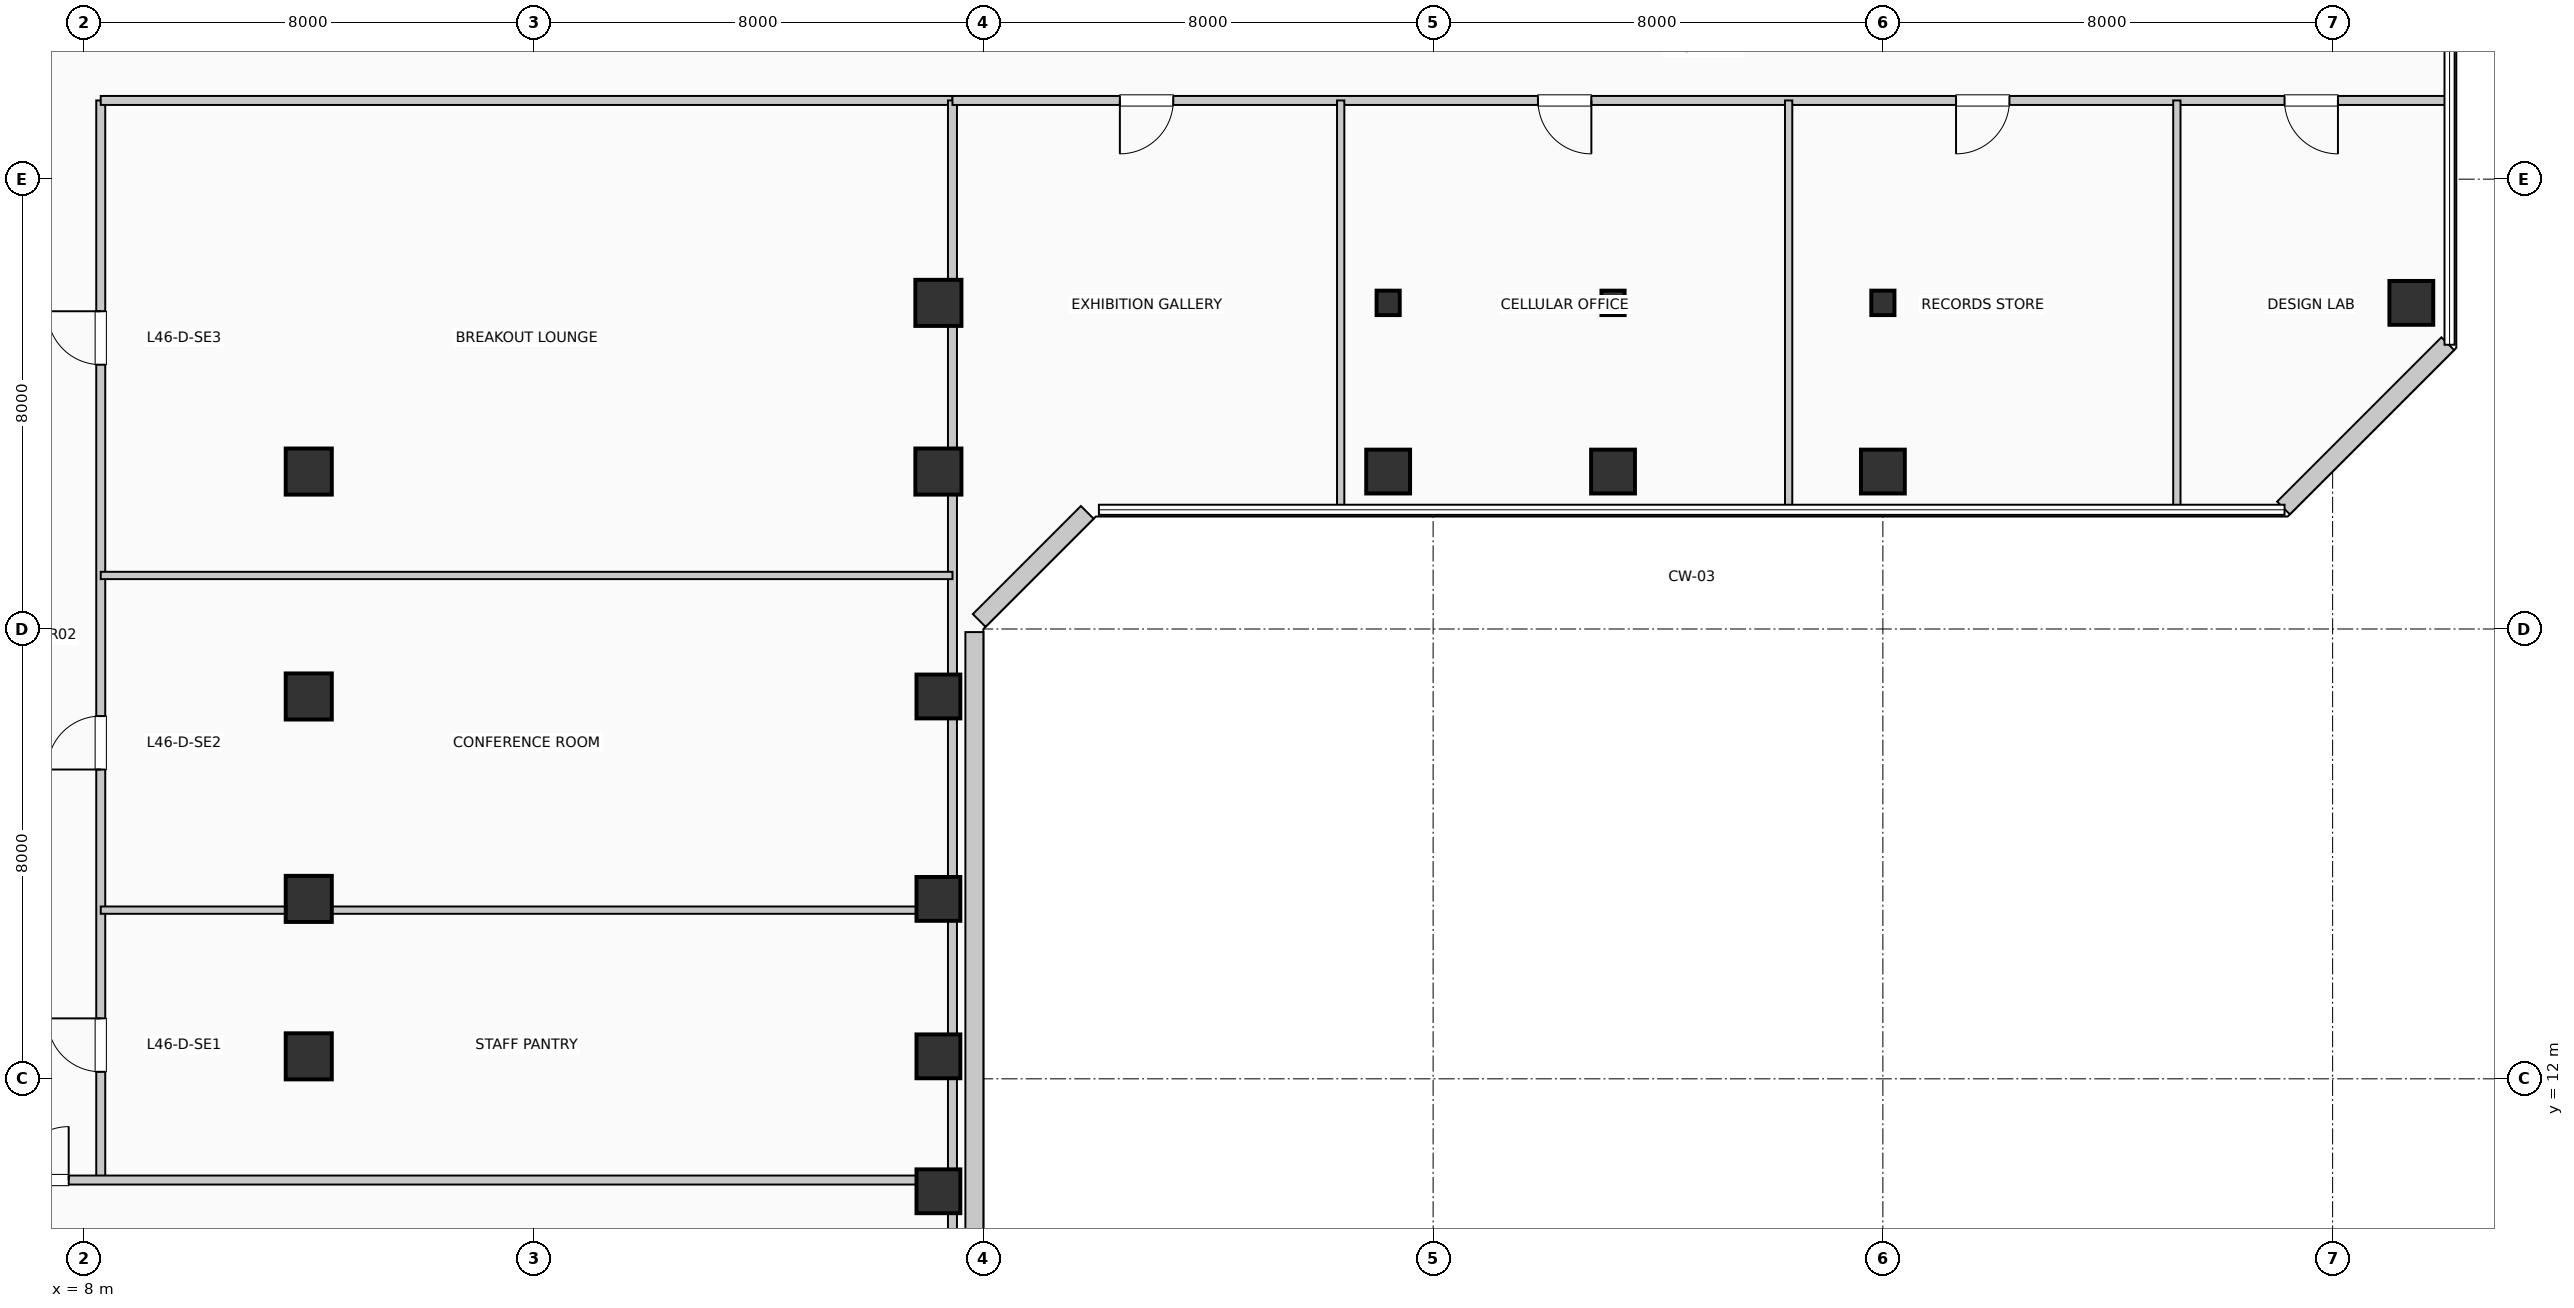
"""IFC4 building model, lengths in metres.
Left out: names, types, materials, properties, quantities, classifications, styles, units other than length and angle.
Written with IfcOpenShell. Run it as: python <this file> out.ifc"""

import sys

from ifc_helpers import new_model, si_unit, direction, frame, frame_2d, origin, origin_2d, place, context, subcontext, project, spatial, rectangle, i_section, extrude, element, fill, save


model = new_model("IFC4")
c1 = context("Model", 3, precision=1e-05, world=origin(), true_north=direction((0.0, 1.0)))
c2 = subcontext(c1, "Body", "Model", "MODEL_VIEW")
j1 = project(units=[si_unit("LENGTHUNIT", "METRE"), si_unit("PLANEANGLEUNIT", "RADIAN")], contexts=[c1])
p1 = place(None, origin())
s1 = spatial("IfcSite", under=j1, at=p1, CompositionType="ELEMENT")
p2 = place(p1, origin())
s2 = spatial("IfcBuilding", under=s1, at=p2, CompositionType="ELEMENT")
p3 = place(p2, frame((0.0, 0.0, 191.4)))
s3 = spatial("IfcBuildingStorey", under=s2, at=p3, CompositionType="ELEMENT", Elevation=191.4)
for number, where, z_axis, x_axis in (
    (1, (12.0, 12.4, 0.0), (0.0, 0.0, 1.0), (1.0, 0.0, 0.0)),
    (2, (12.0, 15.2, 0.0), (0.0, 0.0, 1.0), (1.0, 0.0, 0.0)),
    (3, (12.0, 18.8, 0.0), (0.0, 0.0, 1.0), (1.0, 0.0, 0.0)),
    (4, (12.0, 22.8, 0.0), (0.0, 0.0, 1.0), (1.0, 0.0, 0.0)),
):
    element("IfcColumn", number, at=place(p3, frame(where, z_axis=z_axis, x_axis=x_axis)), inside=s3, PredefinedType="COLUMN", context=c2, shape_type="SweptSolid", body=[
        extrude(rectangle(XDim=0.82, YDim=0.82, at=origin_2d()), origin(), (0.0, 0.0, 1.0), 3.96),
    ])
for number, where, z_axis, x_axis in (
    (5, (23.2, 10.0, 0.0), (0.0, 0.0, 1.0), (1.0, 0.0, 0.0)),
    (6, (23.2, 12.4, 0.0), (0.0, 0.0, 1.0), (1.0, 0.0, 0.0)),
    (7, (23.2, 15.2, 0.0), (0.0, 0.0, 1.0), (1.0, 0.0, 0.0)),
    (8, (23.2, 18.8, 0.0), (0.0, 0.0, 1.0), (1.0, 0.0, 0.0)),
):
    element("IfcColumn", number, at=place(p3, frame(where, z_axis=z_axis, x_axis=x_axis)), inside=s3, PredefinedType="COLUMN", context=c2, shape_type="SweptSolid", body=[
        extrude(rectangle(XDim=0.78, YDim=0.78, at=origin_2d()), origin(), (0.0, 0.0, 1.0), 3.96),
    ])
for number, where, z_axis, x_axis in (
    (9, (23.2, 22.8, 0.0), (0.0, 0.0, 1.0), (1.0, 0.0, 0.0)),
    (10, (23.2, 25.8, 0.0), (0.0, 0.0, 1.0), (1.0, 0.0, 0.0)),
):
    element("IfcColumn", number, at=place(p3, frame(where, z_axis=z_axis, x_axis=x_axis)), inside=s3, PredefinedType="COLUMN", context=c2, shape_type="SweptSolid", body=[
        extrude(rectangle(XDim=0.82, YDim=0.82, at=origin_2d()), origin(), (0.0, 0.0, 1.0), 3.96),
    ])
p4 = place(p3, frame((31.2, 22.8, 0.0), z_axis=(0.0, 0.0, 1.0), x_axis=(1.0, 0.0, 0.0)))
e11 = element("IfcColumn", 11, at=p4, inside=s3, PredefinedType="COLUMN", context=c2, shape_type="SweptSolid", body=[
    extrude(rectangle(XDim=0.78, YDim=0.78, at=origin_2d()), origin(), (0.0, 0.0, 1.0), 3.96),
])
p5 = place(p3, frame((31.2, 25.8, 0.0), z_axis=(0.0, 0.0, 1.0), x_axis=(1.0, 0.0, 0.0)))
e12 = element("IfcColumn", 12, at=p5, inside=s3, PredefinedType="COLUMN", context=c2, shape_type="SweptSolid", body=[
    extrude(i_section(OverallWidth=0.412, OverallDepth=0.435, WebThickness=0.027, FlangeThickness=0.043, at=origin_2d()), origin(), (0.0, 0.0, 1.0), 3.96),
])
p6 = place(p3, frame((35.2, 22.8, 0.0), z_axis=(0.0, 0.0, 1.0), x_axis=(1.0, 0.0, 0.0)))
e13 = element("IfcColumn", 13, at=p6, inside=s3, PredefinedType="COLUMN", context=c2, shape_type="SweptSolid", body=[
    extrude(rectangle(XDim=0.78, YDim=0.78, at=origin_2d()), origin(), (0.0, 0.0, 1.0), 3.96),
])
p7 = place(p3, frame((35.2, 25.8, 0.0), z_axis=(0.0, 0.0, 1.0), x_axis=(1.0, 0.0, 0.0)))
e14 = element("IfcColumn", 14, at=p7, inside=s3, PredefinedType="COLUMN", context=c2, shape_type="SweptSolid", body=[
    extrude(i_section(OverallWidth=0.412, OverallDepth=0.435, WebThickness=0.027, FlangeThickness=0.043, at=origin_2d()), origin(), (0.0, 0.0, 1.0), 3.96),
])
p8 = place(p3, frame((40.0, 22.8, 0.0), z_axis=(0.0, 0.0, 1.0), x_axis=(1.0, 0.0, 0.0)))
e15 = element("IfcColumn", 15, at=p8, inside=s3, PredefinedType="COLUMN", context=c2, shape_type="SweptSolid", body=[
    extrude(rectangle(XDim=0.78, YDim=0.78, at=origin_2d()), origin(), (0.0, 0.0, 1.0), 3.96),
])
p9 = place(p3, frame((40.0, 25.8, 0.0), z_axis=(0.0, 0.0, 1.0), x_axis=(1.0, 0.0, 0.0)))
e16 = element("IfcColumn", 16, at=p9, inside=s3, PredefinedType="COLUMN", context=c2, shape_type="SweptSolid", body=[
    extrude(i_section(OverallWidth=0.412, OverallDepth=0.435, WebThickness=0.027, FlangeThickness=0.043, at=origin_2d()), origin(), (0.0, 0.0, 1.0), 3.96),
])
p10 = place(p3, frame((49.4, 25.8, 0.0), z_axis=(0.0, 0.0, 1.0), x_axis=(1.0, 0.0, 0.0)))
e17 = element("IfcColumn", 17, at=p10, inside=s3, PredefinedType="COLUMN", context=c2, shape_type="SweptSolid", body=[
    extrude(rectangle(XDim=0.78, YDim=0.78, at=origin_2d()), origin(), (0.0, 0.0, 1.0), 3.96),
])
p11 = place(p3, frame((23.84, 8.855, 0.0), z_axis=(0.0, 0.0, 1.0), x_axis=(0.0, 1.0, 0.0)))
e18 = element("IfcWall", 18, at=p11, inside=s3, PredefinedType="SOLIDWALL", context=c2, shape_type="SweptSolid", body=[
    extrude(rectangle(XDim=11.09, YDim=0.32, at=frame_2d((5.545, 0.0))), origin(), (0.0, 0.0, 1.0), 3.71),
])
p12 = place(p3, frame((23.926, 20.152, 0.0), z_axis=(0.0, 0.0, 1.0), x_axis=(0.707106781187, 0.707106781187, 0.0)))
e19 = element("IfcWall", 19, at=p12, inside=s3, PredefinedType="SOLIDWALL", context=c2, shape_type="SweptSolid", body=[
    extrude(rectangle(XDim=2.718, YDim=0.32, at=frame_2d((1.359, 0.0))), origin(), (0.0, 0.0, 1.0), 3.71),
])
p13 = place(p3, frame((47.126, 22.152, 0.0), z_axis=(0.0, 0.0, 1.0), x_axis=(0.707136318428, 0.707077242712, 0.0)))
e20 = element("IfcWall", 20, at=p13, inside=s3, PredefinedType="SOLIDWALL", context=c2, shape_type="SweptSolid", body=[
    extrude(rectangle(XDim=4.133, YDim=0.32, at=frame_2d((2.066, 0.0))), origin(), (0.0, 0.0, 1.0), 3.71),
])
p14 = place(p3, frame((8.3, 10.2, 0.0), z_axis=(0.0, 0.0, 1.0), x_axis=(0.0, 1.0, 0.0)))
e21 = element("IfcWall", 21, at=p14, inside=s3, PredefinedType="PARTITIONING", context=c2, shape_type="SweptSolid", body=[
    extrude(rectangle(XDim=19.2, YDim=0.16, at=frame_2d((9.6, 0.0))), origin(), (0.0, 0.0, 1.0), 3.71),
])
p15 = place(p14, frame((1.925, 0.0, 0.0)))
e22 = element("IfcOpeningElement", 22, at=p15, cuts=e21, PredefinedType="OPENING", context=c2, shape_type="SweptSolid", body=[
    extrude(rectangle(XDim=0.95, YDim=2.15, at=frame_2d((0.475, 1.075))), frame((0.0, 0.09, 0.0), z_axis=(0.0, -1.0, 0.0), x_axis=(1.0, 0.0, 0.0)), (0.0, 0.0, 1.0), 0.18),
])
p16 = place(p14, frame((7.301, 0.0, 0.0)))
e23 = element("IfcOpeningElement", 23, at=p16, cuts=e21, PredefinedType="OPENING", context=c2, shape_type="SweptSolid", body=[
    extrude(rectangle(XDim=0.95, YDim=2.15, at=frame_2d((0.475, 1.075))), frame((0.0, 0.09, 0.0), z_axis=(0.0, -1.0, 0.0), x_axis=(1.0, 0.0, 0.0)), (0.0, 0.0, 1.0), 0.18),
])
p17 = place(p14, frame((14.501, 0.0, 0.0)))
e24 = element("IfcOpeningElement", 24, at=p17, cuts=e21, PredefinedType="OPENING", context=c2, shape_type="SweptSolid", body=[
    extrude(rectangle(XDim=0.95, YDim=2.15, at=frame_2d((0.475, 1.075))), frame((0.0, 0.09, 0.0), z_axis=(0.0, -1.0, 0.0), x_axis=(1.0, 0.0, 0.0)), (0.0, 0.0, 1.0), 0.18),
])
p18 = place(p3, frame((0.19, 10.2, 0.0), z_axis=(0.0, 0.0, 1.0), x_axis=(1.0, 0.0, 0.0)))
e25 = element("IfcWall", 25, at=p18, inside=s3, PredefinedType="PARTITIONING", context=c2, shape_type="SweptSolid", body=[
    extrude(rectangle(XDim=23.26, YDim=0.16, at=frame_2d((11.63, 0.0))), origin(), (0.0, 0.0, 1.0), 3.095),
])
p19 = place(p18, frame((6.59, 0.0, 0.0)))
e26 = element("IfcOpeningElement", 26, at=p19, cuts=e25, PredefinedType="OPENING", context=c2, shape_type="SweptSolid", body=[
    extrude(rectangle(XDim=0.95, YDim=2.15, at=frame_2d((0.475, 1.075))), frame((0.0, 0.09, 0.0), z_axis=(0.0, -1.0, 0.0), x_axis=(1.0, 0.0, 0.0)), (0.0, 0.0, 1.0), 0.18),
])
p20 = place(p3, frame((8.3, 29.4, 0.0), z_axis=(0.0, 0.0, 1.0), x_axis=(1.0, 0.0, 0.0)))
e27 = element("IfcWall", 27, at=p20, inside=s3, PredefinedType="PARTITIONING", context=c2, shape_type="SweptSolid", body=[
    extrude(rectangle(XDim=15.15, YDim=0.16, at=frame_2d((7.575, 0.0))), origin(), (0.0, 0.0, 1.0), 3.365),
])
p21 = place(p3, frame((23.45, 5.99, 0.0), z_axis=(0.0, 0.0, 1.0), x_axis=(0.0, 1.0, 0.0)))
e28 = element("IfcWall", 28, at=p21, inside=s3, PredefinedType="PARTITIONING", context=c2, shape_type="SweptSolid", body=[
    extrude(rectangle(XDim=23.41, YDim=0.16, at=frame_2d((11.705, 0.0))), origin(), (0.0, 0.0, 1.0), 3.095),
])
p22 = place(p3, frame((8.3, 15.0, 0.0), z_axis=(0.0, 0.0, 1.0), x_axis=(1.0, 0.0, 0.0)))
e29 = element("IfcWall", 29, at=p22, inside=s3, PredefinedType="PARTITIONING", context=c2, shape_type="SweptSolid", body=[
    extrude(rectangle(XDim=15.15, YDim=0.13, at=frame_2d((7.575, 0.0))), origin(), (0.0, 0.0, 1.0), 3.095),
])
p23 = place(p3, frame((8.3, 20.952, 0.0), z_axis=(0.0, 0.0, 1.0), x_axis=(1.0, 0.0, 0.0)))
e30 = element("IfcWall", 30, at=p23, inside=s3, PredefinedType="PARTITIONING", context=c2, shape_type="SweptSolid", body=[
    extrude(rectangle(XDim=15.15, YDim=0.13, at=frame_2d((7.575, 0.0))), origin(), (0.0, 0.0, 1.0), 3.71),
])
p24 = place(p3, frame((23.45, 29.4, 0.0), z_axis=(0.0, 0.0, 1.0), x_axis=(1.0, 0.0, 0.0)))
e31 = element("IfcWall", 31, at=p24, inside=s3, PredefinedType="PARTITIONING", context=c2, shape_type="SweptSolid", body=[
    extrude(rectangle(XDim=26.56, YDim=0.16, at=frame_2d((13.28, 0.0))), origin(), (0.0, 0.0, 1.0), 3.365),
])
p25 = place(p24, frame((3.928, 0.0, 0.0), z_axis=(0.0, 0.0, 1.0), x_axis=(-1.0, 0.0, 0.0)))
e32 = element("IfcOpeningElement", 32, at=p25, cuts=e31, PredefinedType="OPENING", context=c2, shape_type="SweptSolid", body=[
    extrude(rectangle(XDim=0.95, YDim=2.15, at=frame_2d((0.475, 1.075))), frame((0.0, 0.09, 0.0), z_axis=(0.0, -1.0, 0.0), x_axis=(1.0, 0.0, 0.0)), (0.0, 0.0, 1.0), 0.18),
])
p26 = place(p24, frame((11.365, 0.0, 0.0), z_axis=(0.0, 0.0, 1.0), x_axis=(-1.0, 0.0, 0.0)))
e33 = element("IfcOpeningElement", 33, at=p26, cuts=e31, PredefinedType="OPENING", context=c2, shape_type="SweptSolid", body=[
    extrude(rectangle(XDim=0.95, YDim=2.15, at=frame_2d((0.475, 1.075))), frame((0.0, 0.09, 0.0), z_axis=(0.0, -1.0, 0.0), x_axis=(1.0, 0.0, 0.0)), (0.0, 0.0, 1.0), 0.18),
])
p27 = place(p24, frame((18.801, 0.0, 0.0), z_axis=(0.0, 0.0, 1.0), x_axis=(-1.0, 0.0, 0.0)))
e34 = element("IfcOpeningElement", 34, at=p27, cuts=e31, PredefinedType="OPENING", context=c2, shape_type="SweptSolid", body=[
    extrude(rectangle(XDim=0.95, YDim=2.15, at=frame_2d((0.475, 1.075))), frame((0.0, 0.09, 0.0), z_axis=(0.0, -1.0, 0.0), x_axis=(1.0, 0.0, 0.0)), (0.0, 0.0, 1.0), 0.18),
])
p28 = place(p24, frame((24.645, 0.0, 0.0), z_axis=(0.0, 0.0, 1.0), x_axis=(-1.0, 0.0, 0.0)))
e35 = element("IfcOpeningElement", 35, at=p28, cuts=e31, PredefinedType="OPENING", context=c2, shape_type="SweptSolid", body=[
    extrude(rectangle(XDim=0.95, YDim=2.15, at=frame_2d((0.475, 1.075))), frame((0.0, 0.09, 0.0), z_axis=(0.0, -1.0, 0.0), x_axis=(1.0, 0.0, 0.0)), (0.0, 0.0, 1.0), 0.18),
])
for number, where, z_axis, x_axis in (
    (36, (30.356, 22.19, 0.0), (0.0, 0.0, 1.0), (0.0, 1.0, 0.0)),
    (37, (38.323, 22.19, 0.0), (0.0, 0.0, 1.0), (0.0, 1.0, 0.0)),
    (38, (45.229, 22.19, 0.0), (0.0, 0.0, 1.0), (0.0, 1.0, 0.0)),
):
    element("IfcWall", number, at=place(p3, frame(where, z_axis=z_axis, x_axis=x_axis)), inside=s3, PredefinedType="PARTITIONING", context=c2, shape_type="SweptSolid", body=[
        extrude(rectangle(XDim=7.21, YDim=0.13, at=frame_2d((3.605, 0.0))), origin(), (0.0, 0.0, 1.0), 3.71),
    ])
p29 = place(p19, origin())
e39 = element("IfcDoor", 39, at=p29, inside=s3, OperationType="SINGLE_SWING_RIGHT", PredefinedType="DOOR", context=c2, shape_type="SweptSolid", body=[
    extrude(rectangle(XDim=0.95, YDim=2.15, at=frame_2d((0.475, 1.075))), frame((0.0, 0.025, 0.0), z_axis=(0.0, -1.0, 0.0), x_axis=(1.0, 0.0, 0.0)), (0.0, 0.0, 1.0), 0.05),
])
fill(e26, e39)
p30 = place(p15, origin())
e40 = element("IfcDoor", 40, at=p30, inside=s3, OperationType="SINGLE_SWING_RIGHT", PredefinedType="DOOR", context=c2, shape_type="SweptSolid", body=[
    extrude(rectangle(XDim=0.95, YDim=2.15, at=frame_2d((0.475, 1.075))), frame((0.0, 0.025, 0.0), z_axis=(0.0, -1.0, 0.0), x_axis=(1.0, 0.0, 0.0)), (0.0, 0.0, 1.0), 0.05),
])
fill(e22, e40)
p31 = place(p16, origin())
e41 = element("IfcDoor", 41, at=p31, inside=s3, OperationType="SINGLE_SWING_LEFT", PredefinedType="DOOR", context=c2, shape_type="SweptSolid", body=[
    extrude(rectangle(XDim=0.95, YDim=2.15, at=frame_2d((0.475, 1.075))), frame((0.0, 0.025, 0.0), z_axis=(0.0, -1.0, 0.0), x_axis=(1.0, 0.0, 0.0)), (0.0, 0.0, 1.0), 0.05),
])
fill(e23, e41)
p32 = place(p17, origin())
e42 = element("IfcDoor", 42, at=p32, inside=s3, OperationType="SINGLE_SWING_RIGHT", PredefinedType="DOOR", context=c2, shape_type="SweptSolid", body=[
    extrude(rectangle(XDim=0.95, YDim=2.15, at=frame_2d((0.475, 1.075))), frame((0.0, 0.025, 0.0), z_axis=(0.0, -1.0, 0.0), x_axis=(1.0, 0.0, 0.0)), (0.0, 0.0, 1.0), 0.05),
])
fill(e24, e42)
p33 = place(p25, origin())
e43 = element("IfcDoor", 43, at=p33, inside=s3, OperationType="SINGLE_SWING_LEFT", PredefinedType="DOOR", context=c2, shape_type="SweptSolid", body=[
    extrude(rectangle(XDim=0.95, YDim=2.15, at=frame_2d((0.475, 1.075))), frame((0.0, 0.025, 0.0), z_axis=(0.0, -1.0, 0.0), x_axis=(1.0, 0.0, 0.0)), (0.0, 0.0, 1.0), 0.05),
])
fill(e32, e43)
p34 = place(p26, origin())
e44 = element("IfcDoor", 44, at=p34, inside=s3, OperationType="SINGLE_SWING_RIGHT", PredefinedType="DOOR", context=c2, shape_type="SweptSolid", body=[
    extrude(rectangle(XDim=0.95, YDim=2.15, at=frame_2d((0.475, 1.075))), frame((0.0, 0.025, 0.0), z_axis=(0.0, -1.0, 0.0), x_axis=(1.0, 0.0, 0.0)), (0.0, 0.0, 1.0), 0.05),
])
fill(e33, e44)
p35 = place(p27, origin())
e45 = element("IfcDoor", 45, at=p35, inside=s3, OperationType="SINGLE_SWING_LEFT", PredefinedType="DOOR", context=c2, shape_type="SweptSolid", body=[
    extrude(rectangle(XDim=0.95, YDim=2.15, at=frame_2d((0.475, 1.075))), frame((0.0, 0.025, 0.0), z_axis=(0.0, -1.0, 0.0), x_axis=(1.0, 0.0, 0.0)), (0.0, 0.0, 1.0), 0.05),
])
fill(e34, e45)
p36 = place(p28, origin())
e46 = element("IfcDoor", 46, at=p36, inside=s3, OperationType="SINGLE_SWING_RIGHT", PredefinedType="DOOR", context=c2, shape_type="SweptSolid", body=[
    extrude(rectangle(XDim=0.95, YDim=2.15, at=frame_2d((0.475, 1.075))), frame((0.0, 0.025, 0.0), z_axis=(0.0, -1.0, 0.0), x_axis=(1.0, 0.0, 0.0)), (0.0, 0.0, 1.0), 0.05),
])
fill(e35, e46)
save(model, sys.argv[1])
